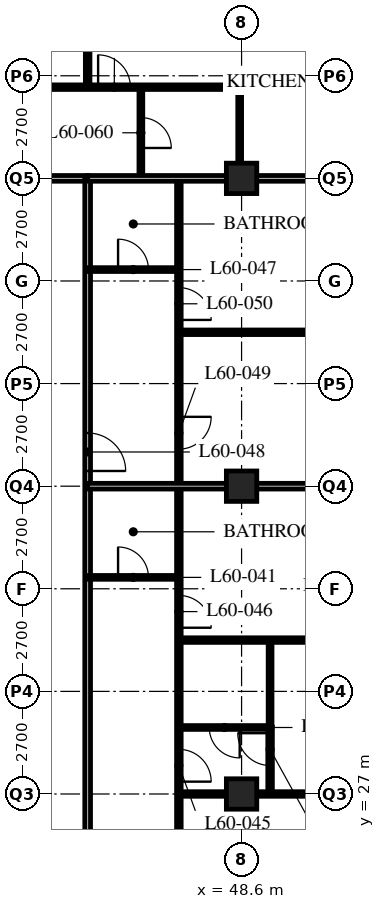
"""IFC4 building model, lengths in metres.
Left out: names, types, materials, properties, quantities, classifications, styles, units other than length and angle.
Written with IfcOpenShell. Run it as: python <this file> out.ifc"""

import sys

from ifc_helpers import new_model, si_unit, direction, frame, frame_2d, origin, origin_2d, place, context, subcontext, project, spatial, rectangle, hollow_rectangle, extrude, element, fill, save


model = new_model("IFC4")
c1 = context("Model", 3, precision=1e-05, world=origin(), true_north=direction((0.0, 1.0)))
c2 = subcontext(c1, "Body", "Model", "MODEL_VIEW")
j1 = project(units=[si_unit("LENGTHUNIT", "METRE"), si_unit("PLANEANGLEUNIT", "RADIAN")], contexts=[c1])
p1 = place(None, origin())
s1 = spatial("IfcSite", under=j1, at=p1, CompositionType="ELEMENT")
p2 = place(p1, origin())
s2 = spatial("IfcBuilding", under=s1, at=p2, CompositionType="ELEMENT")
p3 = place(p2, frame((0.0, 0.0, 231.6)))
s3 = spatial("IfcBuildingStorey", under=s2, at=p3, CompositionType="ELEMENT", Elevation=231.6)
for number, where, z_axis, x_axis in (
    (1, (48.6, 27.0, 0.0), (0.0, 0.0, 1.0), (1.0, 0.0, 0.0)),
    (2, (48.6, 35.1, 0.0), (0.0, 0.0, 1.0), (1.0, 0.0, 0.0)),
    (3, (48.6, 43.2, 0.0), (0.0, 0.0, 1.0), (1.0, 0.0, 0.0)),
):
    element("IfcColumn", number, at=place(p3, frame(where, z_axis=z_axis, x_axis=x_axis)), inside=s3, PredefinedType="COLUMN", context=c2, shape_type="SweptSolid", body=[
        extrude(hollow_rectangle(XDim=0.8, YDim=0.8, WallThickness=0.08, at=origin_2d()), origin(), (0.0, 0.0, 1.0), 3.6),
    ])
p4 = place(p3, frame((8.1, 43.2, 0.0), z_axis=(0.0, 0.0, 1.0), x_axis=(1.0, 0.0, 0.0)))
e4 = element("IfcWall", 4, at=p4, inside=s3, PredefinedType="PARTITIONING", context=c2, shape_type="SweptSolid", body=[
    extrude(rectangle(XDim=36.45, YDim=0.15, at=frame_2d((18.225, 0.0))), origin(), (0.0, 0.0, 1.0), 2.35),
])
p5 = place(p4, frame((4.45, 0.0, 0.0)))
e5 = element("IfcOpeningElement", 5, at=p5, cuts=e4, PredefinedType="OPENING", context=c2, shape_type="SweptSolid", body=[
    extrude(rectangle(XDim=1.0, YDim=2.1, at=frame_2d((0.5, 1.05))), frame((0.0, 0.085, 0.0), z_axis=(0.0, -1.0, 0.0), x_axis=(1.0, 0.0, 0.0)), (0.0, 0.0, 1.0), 0.17),
])
p6 = place(p4, frame((17.1, 0.0, 0.0)))
e6 = element("IfcOpeningElement", 6, at=p6, cuts=e4, PredefinedType="OPENING", context=c2, shape_type="SweptSolid", body=[
    extrude(rectangle(XDim=1.0, YDim=2.1, at=frame_2d((0.5, 1.05))), frame((0.0, 0.085, 0.0), z_axis=(0.0, -1.0, 0.0), x_axis=(1.0, 0.0, 0.0)), (0.0, 0.0, 1.0), 0.17),
])
p7 = place(p4, frame((29.05, 0.0, 0.0)))
e7 = element("IfcOpeningElement", 7, at=p7, cuts=e4, PredefinedType="OPENING", context=c2, shape_type="SweptSolid", body=[
    extrude(rectangle(XDim=1.0, YDim=2.1, at=frame_2d((0.5, 1.05))), frame((0.0, 0.085, 0.0), z_axis=(0.0, -1.0, 0.0), x_axis=(1.0, 0.0, 0.0)), (0.0, 0.0, 1.0), 0.17),
])
p8 = place(p4, frame((33.925, 0.0, 0.0)))
e8 = element("IfcOpeningElement", 8, at=p8, cuts=e4, PredefinedType="OPENING", context=c2, shape_type="SweptSolid", body=[
    extrude(rectangle(XDim=1.0, YDim=2.1, at=frame_2d((0.5, 1.05))), frame((0.0, 0.085, 0.0), z_axis=(0.0, -1.0, 0.0), x_axis=(1.0, 0.0, 0.0)), (0.0, 0.0, 1.0), 0.17),
])
p9 = place(p4, frame((1.525, 0.0, 0.0)))
e9 = element("IfcOpeningElement", 9, at=p9, cuts=e4, PredefinedType="OPENING", context=c2, shape_type="SweptSolid", body=[
    extrude(rectangle(XDim=1.0, YDim=2.1, at=frame_2d((0.5, 1.05))), frame((0.0, 0.085, 0.0), z_axis=(0.0, -1.0, 0.0), x_axis=(1.0, 0.0, 0.0)), (0.0, 0.0, 1.0), 0.17),
])
p10 = place(p3, frame((44.55, 18.9, 0.0), z_axis=(0.0, 0.0, 1.0), x_axis=(0.0, 1.0, 0.0)))
e10 = element("IfcWall", 10, at=p10, inside=s3, PredefinedType="PARTITIONING", context=c2, shape_type="SweptSolid", body=[
    extrude(rectangle(XDim=24.3, YDim=0.15, at=frame_2d((12.15, 0.0))), origin(), (0.0, 0.0, 1.0), 3.35),
])
p11 = place(p10, frame((0.4, 0.0, 0.0)))
e11 = element("IfcOpeningElement", 11, at=p11, cuts=e10, PredefinedType="OPENING", context=c2, shape_type="SweptSolid", body=[
    extrude(rectangle(XDim=1.0, YDim=2.1, at=frame_2d((0.5, 1.05))), frame((0.0, 0.085, 0.0), z_axis=(0.0, -1.0, 0.0), x_axis=(1.0, 0.0, 0.0)), (0.0, 0.0, 1.0), 0.17),
])
p12 = place(p10, frame((16.6, 0.0, 0.0)))
e12 = element("IfcOpeningElement", 12, at=p12, cuts=e10, PredefinedType="OPENING", context=c2, shape_type="SweptSolid", body=[
    extrude(rectangle(XDim=1.0, YDim=2.1, at=frame_2d((0.5, 1.05))), frame((0.0, 0.085, 0.0), z_axis=(0.0, -1.0, 0.0), x_axis=(1.0, 0.0, 0.0)), (0.0, 0.0, 1.0), 0.17),
])
p13 = place(p3, frame((46.95, 18.9, 0.0), z_axis=(0.0, 0.0, 1.0), x_axis=(0.0, 1.0, 0.0)))
e13 = element("IfcWall", 13, at=p13, inside=s3, PredefinedType="PARTITIONING", context=c2, shape_type="SweptSolid", body=[
    extrude(rectangle(XDim=24.3, YDim=0.12, at=frame_2d((12.15, 0.0))), origin(), (0.0, 0.0, 1.0), 3.35),
])
p14 = place(p13, frame((0.975, 0.0, 0.0)))
e14 = element("IfcOpeningElement", 14, at=p14, cuts=e13, PredefinedType="OPENING", context=c2, shape_type="SweptSolid", body=[
    extrude(rectangle(XDim=0.85, YDim=2.1, at=frame_2d((0.425, 1.05))), frame((0.0, 0.07, 0.0), z_axis=(0.0, -1.0, 0.0), x_axis=(1.0, 0.0, 0.0)), (0.0, 0.0, 1.0), 0.14),
])
p15 = place(p13, frame((8.425, 0.0, 0.0)))
e15 = element("IfcOpeningElement", 15, at=p15, cuts=e13, PredefinedType="OPENING", context=c2, shape_type="SweptSolid", body=[
    extrude(rectangle(XDim=0.85, YDim=2.1, at=frame_2d((0.425, 1.05))), frame((0.0, 0.07, 0.0), z_axis=(0.0, -1.0, 0.0), x_axis=(1.0, 0.0, 0.0)), (0.0, 0.0, 1.0), 0.14),
])
p16 = place(p13, frame((12.475, 0.0, 0.0)))
e16 = element("IfcOpeningElement", 16, at=p16, cuts=e13, PredefinedType="OPENING", context=c2, shape_type="SweptSolid", body=[
    extrude(rectangle(XDim=0.85, YDim=2.1, at=frame_2d((0.425, 1.05))), frame((0.0, 0.07, 0.0), z_axis=(0.0, -1.0, 0.0), x_axis=(1.0, 0.0, 0.0)), (0.0, 0.0, 1.0), 0.14),
])
p17 = place(p13, frame((17.175, 0.0, 0.0)))
e17 = element("IfcOpeningElement", 17, at=p17, cuts=e13, PredefinedType="OPENING", context=c2, shape_type="SweptSolid", body=[
    extrude(rectangle(XDim=0.85, YDim=2.1, at=frame_2d((0.425, 1.05))), frame((0.0, 0.07, 0.0), z_axis=(0.0, -1.0, 0.0), x_axis=(1.0, 0.0, 0.0)), (0.0, 0.0, 1.0), 0.14),
])
p18 = place(p13, frame((20.575, 0.0, 0.0)))
e18 = element("IfcOpeningElement", 18, at=p18, cuts=e13, PredefinedType="OPENING", context=c2, shape_type="SweptSolid", body=[
    extrude(rectangle(XDim=0.85, YDim=2.1, at=frame_2d((0.425, 1.05))), frame((0.0, 0.07, 0.0), z_axis=(0.0, -1.0, 0.0), x_axis=(1.0, 0.0, 0.0)), (0.0, 0.0, 1.0), 0.14),
])
p19 = place(p3, frame((44.55, 32.7, 0.0), z_axis=(0.0, 0.0, 1.0), x_axis=(1.0, 0.0, 0.0)))
e19 = element("IfcWall", 19, at=p19, inside=s3, PredefinedType="PARTITIONING", context=c2, shape_type="SweptSolid", body=[
    extrude(rectangle(XDim=2.4, YDim=0.1, at=frame_2d((1.2, 0.0))), origin(), (0.0, 0.0, 1.0), 3.35),
])
p20 = place(p19, frame((0.8, 0.0, 0.0)))
e20 = element("IfcOpeningElement", 20, at=p20, cuts=e19, PredefinedType="OPENING", context=c2, shape_type="SweptSolid", body=[
    extrude(rectangle(XDim=0.8, YDim=2.1, at=frame_2d((0.4, 1.05))), frame((0.0, 0.06, 0.0), z_axis=(0.0, -1.0, 0.0), x_axis=(1.0, 0.0, 0.0)), (0.0, 0.0, 1.0), 0.12),
])
p21 = place(p3, frame((46.95, 28.75, 0.0), z_axis=(0.0, 0.0, 1.0), x_axis=(1.0, 0.0, 0.0)))
e21 = element("IfcWall", 21, at=p21, inside=s3, PredefinedType="PARTITIONING", context=c2, shape_type="SweptSolid", body=[
    extrude(rectangle(XDim=2.4, YDim=0.1, at=frame_2d((1.2, 0.0))), origin(), (0.0, 0.0, 1.0), 3.35),
])
p22 = place(p21, frame((0.8, 0.0, 0.0)))
e22 = element("IfcOpeningElement", 22, at=p22, cuts=e21, PredefinedType="OPENING", context=c2, shape_type="SweptSolid", body=[
    extrude(rectangle(XDim=0.8, YDim=2.1, at=frame_2d((0.4, 1.05))), frame((0.0, 0.06, 0.0), z_axis=(0.0, -1.0, 0.0), x_axis=(1.0, 0.0, 0.0)), (0.0, 0.0, 1.0), 0.12),
])
p23 = place(p3, frame((49.35, 28.75, 0.0), z_axis=(0.0, 0.0, 1.0), x_axis=(0.0, 1.0, 0.0)))
e23 = element("IfcWall", 23, at=p23, inside=s3, PredefinedType="PARTITIONING", context=c2, shape_type="SweptSolid", body=[
    extrude(rectangle(XDim=2.3, YDim=0.1, at=frame_2d((1.15, 0.0))), origin(), (0.0, 0.0, 1.0), 3.35),
])
p24 = place(p3, frame((46.95, 27.0, 0.0), z_axis=(0.0, 0.0, 1.0), x_axis=(1.0, 0.0, 0.0)))
e24 = element("IfcWall", 24, at=p24, inside=s3, PredefinedType="PARTITIONING", context=c2, shape_type="SweptSolid", body=[
    extrude(rectangle(XDim=9.45, YDim=0.12, at=frame_2d((4.725, 0.0))), origin(), (0.0, 0.0, 1.0), 2.588),
])
p25 = place(p3, frame((46.95, 31.05, 0.0), z_axis=(0.0, 0.0, 1.0), x_axis=(1.0, 0.0, 0.0)))
e25 = element("IfcWall", 25, at=p25, inside=s3, PredefinedType="PARTITIONING", context=c2, shape_type="SweptSolid", body=[
    extrude(rectangle(XDim=9.45, YDim=0.12, at=frame_2d((4.725, 0.0))), origin(), (0.0, 0.0, 1.0), 3.35),
])
p26 = place(p3, frame((44.55, 35.1, 0.0), z_axis=(0.0, 0.0, 1.0), x_axis=(1.0, 0.0, 0.0)))
e26 = element("IfcWall", 26, at=p26, inside=s3, PredefinedType="PARTITIONING", context=c2, shape_type="SweptSolid", body=[
    extrude(rectangle(XDim=11.85, YDim=0.15, at=frame_2d((5.925, 0.0))), origin(), (0.0, 0.0, 1.0), 2.588),
])
p27 = place(p3, frame((44.55, 40.8, 0.0), z_axis=(0.0, 0.0, 1.0), x_axis=(1.0, 0.0, 0.0)))
e27 = element("IfcWall", 27, at=p27, inside=s3, PredefinedType="PARTITIONING", context=c2, shape_type="SweptSolid", body=[
    extrude(rectangle(XDim=2.4, YDim=0.1, at=frame_2d((1.2, 0.0))), origin(), (0.0, 0.0, 1.0), 3.35),
])
p28 = place(p27, frame((0.8, 0.0, 0.0)))
e28 = element("IfcOpeningElement", 28, at=p28, cuts=e27, PredefinedType="OPENING", context=c2, shape_type="SweptSolid", body=[
    extrude(rectangle(XDim=0.8, YDim=2.1, at=frame_2d((0.4, 1.05))), frame((0.0, 0.06, 0.0), z_axis=(0.0, -1.0, 0.0), x_axis=(1.0, 0.0, 0.0)), (0.0, 0.0, 1.0), 0.12),
])
p29 = place(p3, frame((46.95, 39.15, 0.0), z_axis=(0.0, 0.0, 1.0), x_axis=(1.0, 0.0, 0.0)))
e29 = element("IfcWall", 29, at=p29, inside=s3, PredefinedType="PARTITIONING", context=c2, shape_type="SweptSolid", body=[
    extrude(rectangle(XDim=9.45, YDim=0.12, at=frame_2d((4.725, 0.0))), origin(), (0.0, 0.0, 1.0), 3.35),
])
p30 = place(p3, frame((40.5, 45.6, 0.0), z_axis=(0.0, 0.0, 1.0), x_axis=(1.0, 0.0, 0.0)))
e30 = element("IfcWall", 30, at=p30, inside=s3, PredefinedType="PARTITIONING", context=c2, shape_type="SweptSolid", body=[
    extrude(rectangle(XDim=8.05, YDim=0.12, at=frame_2d((4.025, 0.0))), origin(), (0.0, 0.0, 1.0), 3.35),
])
p31 = place(p30, frame((0.475, 0.0, 0.0)))
e31 = element("IfcOpeningElement", 31, at=p31, cuts=e30, PredefinedType="OPENING", context=c2, shape_type="SweptSolid", body=[
    extrude(rectangle(XDim=0.85, YDim=2.1, at=frame_2d((0.425, 1.05))), frame((0.0, 0.07, 0.0), z_axis=(0.0, -1.0, 0.0), x_axis=(1.0, 0.0, 0.0)), (0.0, 0.0, 1.0), 0.14),
])
p32 = place(p30, frame((4.325, 0.0, 0.0)))
e32 = element("IfcOpeningElement", 32, at=p32, cuts=e30, PredefinedType="OPENING", context=c2, shape_type="SweptSolid", body=[
    extrude(rectangle(XDim=0.85, YDim=2.1, at=frame_2d((0.425, 1.05))), frame((0.0, 0.07, 0.0), z_axis=(0.0, -1.0, 0.0), x_axis=(1.0, 0.0, 0.0)), (0.0, 0.0, 1.0), 0.14),
])
p33 = place(p3, frame((45.95, 43.2, 0.0), z_axis=(0.0, 0.0, 1.0), x_axis=(0.0, 1.0, 0.0)))
e33 = element("IfcWall", 33, at=p33, inside=s3, PredefinedType="PARTITIONING", context=c2, shape_type="SweptSolid", body=[
    extrude(rectangle(XDim=2.4, YDim=0.1, at=frame_2d((1.2, 0.0))), origin(), (0.0, 0.0, 1.0), 3.35),
])
p34 = place(p33, frame((0.8, 0.0, 0.0)))
e34 = element("IfcOpeningElement", 34, at=p34, cuts=e33, PredefinedType="OPENING", context=c2, shape_type="SweptSolid", body=[
    extrude(rectangle(XDim=0.8, YDim=2.1, at=frame_2d((0.4, 1.05))), frame((0.0, 0.06, 0.0), z_axis=(0.0, -1.0, 0.0), x_axis=(1.0, 0.0, 0.0)), (0.0, 0.0, 1.0), 0.12),
])
p35 = place(p3, frame((48.55, 43.2, 0.0), z_axis=(0.0, 0.0, 1.0), x_axis=(0.0, 1.0, 0.0)))
e35 = element("IfcWall", 35, at=p35, inside=s3, PredefinedType="PARTITIONING", context=c2, shape_type="SweptSolid", body=[
    extrude(rectangle(XDim=2.4, YDim=0.1, at=frame_2d((1.2, 0.0))), origin(), (0.0, 0.0, 1.0), 2.35),
])
p36 = place(p3, frame((44.55, 45.6, 0.0), z_axis=(0.0, 0.0, 1.0), x_axis=(0.0, 1.0, 0.0)))
e36 = element("IfcWall", 36, at=p36, inside=s3, PredefinedType="PARTITIONING", context=c2, shape_type="SweptSolid", body=[
    extrude(rectangle(XDim=13.5, YDim=0.12, at=frame_2d((6.75, 0.0))), origin(), (0.0, 0.0, 1.0), 3.35),
])
p37 = place(p3, frame((44.55, 43.2, 0.0), z_axis=(0.0, 0.0, 1.0), x_axis=(1.0, 0.0, 0.0)))
e37 = element("IfcWall", 37, at=p37, inside=s3, PredefinedType="PARTITIONING", context=c2, shape_type="SweptSolid", body=[
    extrude(rectangle(XDim=11.85, YDim=0.15, at=frame_2d((5.925, 0.0))), origin(), (0.0, 0.0, 1.0), 2.35),
])
p38 = place(p3, frame((49.35, 28.76, 0.0), z_axis=(0.0, 0.0, 1.0), x_axis=(0.0, -1.0, 0.0)))
e38 = element("IfcWall", 38, at=p38, inside=s3, PredefinedType="PARTITIONING", context=c2, shape_type="SweptSolid", body=[
    extrude(rectangle(XDim=1.76, YDim=0.12, at=frame_2d((0.88, 0.0))), origin(), (0.0, 0.0, 1.0), 3.35),
])
p39 = place(p38, frame((0.16, 0.0, 0.0)))
e39 = element("IfcOpeningElement", 39, at=p39, cuts=e38, PredefinedType="OPENING", context=c2, shape_type="SweptSolid", body=[
    extrude(rectangle(XDim=0.85, YDim=2.1, at=frame_2d((0.425, 1.05))), frame((0.0, 0.07, 0.0), z_axis=(0.0, -1.0, 0.0), x_axis=(1.0, 0.0, 0.0)), (0.0, 0.0, 1.0), 0.14),
])
p40 = place(p20, origin())
e40 = element("IfcDoor", 40, at=p40, inside=s3, OperationType="SINGLE_SWING_LEFT", PredefinedType="DOOR", context=c2, shape_type="SweptSolid", body=[
    extrude(rectangle(XDim=0.8, YDim=2.1, at=frame_2d((0.4, 1.05))), frame((0.0, 0.025, 0.0), z_axis=(0.0, -1.0, 0.0), x_axis=(1.0, 0.0, 0.0)), (0.0, 0.0, 1.0), 0.05),
])
fill(e20, e40)
p41 = place(p22, origin())
e41 = element("IfcDoor", 41, at=p41, inside=s3, OperationType="SINGLE_SWING_LEFT", PredefinedType="DOOR", context=c2, shape_type="SweptSolid", body=[
    extrude(rectangle(XDim=0.8, YDim=2.1, at=frame_2d((0.4, 1.05))), frame((0.0, 0.025, 0.0), z_axis=(0.0, -1.0, 0.0), x_axis=(1.0, 0.0, 0.0)), (0.0, 0.0, 1.0), 0.05),
])
fill(e22, e41)
p42 = place(p15, origin())
e42 = element("IfcDoor", 42, at=p42, inside=s3, OperationType="SINGLE_SWING_RIGHT", PredefinedType="DOOR", context=c2, shape_type="SweptSolid", body=[
    extrude(rectangle(XDim=0.85, YDim=2.1, at=frame_2d((0.425, 1.05))), frame((0.0, 0.025, 0.0), z_axis=(0.0, -1.0, 0.0), x_axis=(1.0, 0.0, 0.0)), (0.0, 0.0, 1.0), 0.05),
])
fill(e15, e42)
p43 = place(p16, origin())
e43 = element("IfcDoor", 43, at=p43, inside=s3, OperationType="SINGLE_SWING_RIGHT", PredefinedType="DOOR", context=c2, shape_type="SweptSolid", body=[
    extrude(rectangle(XDim=0.85, YDim=2.1, at=frame_2d((0.425, 1.05))), frame((0.0, 0.025, 0.0), z_axis=(0.0, -1.0, 0.0), x_axis=(1.0, 0.0, 0.0)), (0.0, 0.0, 1.0), 0.05),
])
fill(e16, e43)
p44 = place(p28, origin())
e44 = element("IfcDoor", 44, at=p44, inside=s3, OperationType="SINGLE_SWING_LEFT", PredefinedType="DOOR", context=c2, shape_type="SweptSolid", body=[
    extrude(rectangle(XDim=0.8, YDim=2.1, at=frame_2d((0.4, 1.05))), frame((0.0, 0.025, 0.0), z_axis=(0.0, -1.0, 0.0), x_axis=(1.0, 0.0, 0.0)), (0.0, 0.0, 1.0), 0.05),
])
fill(e28, e44)
p45 = place(p12, origin())
e45 = element("IfcDoor", 45, at=p45, inside=s3, OperationType="SINGLE_SWING_RIGHT", PredefinedType="DOOR", context=c2, shape_type="SweptSolid", body=[
    extrude(rectangle(XDim=1.0, YDim=2.1, at=frame_2d((0.5, 1.05))), frame((0.0, 0.025, 0.0), z_axis=(0.0, -1.0, 0.0), x_axis=(1.0, 0.0, 0.0)), (0.0, 0.0, 1.0), 0.05),
])
fill(e12, e45)
p46 = place(p17, origin())
e46 = element("IfcDoor", 46, at=p46, inside=s3, OperationType="SINGLE_SWING_LEFT", PredefinedType="DOOR", context=c2, shape_type="SweptSolid", body=[
    extrude(rectangle(XDim=0.85, YDim=2.1, at=frame_2d((0.425, 1.05))), frame((0.0, 0.025, 0.0), z_axis=(0.0, -1.0, 0.0), x_axis=(1.0, 0.0, 0.0)), (0.0, 0.0, 1.0), 0.05),
])
fill(e17, e46)
p47 = place(p18, origin())
e47 = element("IfcDoor", 47, at=p47, inside=s3, OperationType="SINGLE_SWING_RIGHT", PredefinedType="DOOR", context=c2, shape_type="SweptSolid", body=[
    extrude(rectangle(XDim=0.85, YDim=2.1, at=frame_2d((0.425, 1.05))), frame((0.0, 0.025, 0.0), z_axis=(0.0, -1.0, 0.0), x_axis=(1.0, 0.0, 0.0)), (0.0, 0.0, 1.0), 0.05),
])
fill(e18, e47)
p48 = place(p34, origin())
e48 = element("IfcDoor", 48, at=p48, inside=s3, OperationType="SINGLE_SWING_RIGHT", PredefinedType="DOOR", context=c2, shape_type="SweptSolid", body=[
    extrude(rectangle(XDim=0.8, YDim=2.1, at=frame_2d((0.4, 1.05))), frame((0.0, 0.025, 0.0), z_axis=(0.0, -1.0, 0.0), x_axis=(1.0, 0.0, 0.0)), (0.0, 0.0, 1.0), 0.05),
])
fill(e34, e48)
p49 = place(p32, origin())
e49 = element("IfcDoor", 49, at=p49, inside=s3, OperationType="SINGLE_SWING_LEFT", PredefinedType="DOOR", context=c2, shape_type="SweptSolid", body=[
    extrude(rectangle(XDim=0.85, YDim=2.1, at=frame_2d((0.425, 1.05))), frame((0.0, 0.025, 0.0), z_axis=(0.0, -1.0, 0.0), x_axis=(1.0, 0.0, 0.0)), (0.0, 0.0, 1.0), 0.05),
])
fill(e32, e49)
p50 = place(p39, origin())
e50 = element("IfcDoor", 50, at=p50, inside=s3, OperationType="SINGLE_SWING_RIGHT", PredefinedType="DOOR", context=c2, shape_type="SweptSolid", body=[
    extrude(rectangle(XDim=0.85, YDim=2.1, at=frame_2d((0.425, 1.05))), frame((0.0, 0.025, 0.0), z_axis=(0.0, -1.0, 0.0), x_axis=(1.0, 0.0, 0.0)), (0.0, 0.0, 1.0), 0.05),
])
fill(e39, e50)
save(model, sys.argv[1])
